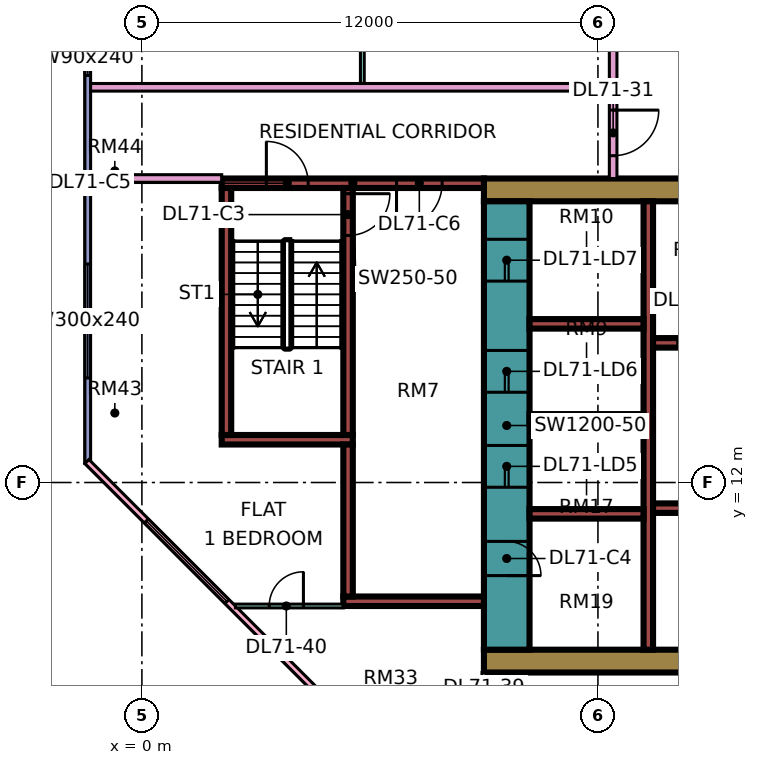
"""IFC4 building model, lengths in metres.
Left out: names, types, materials, properties, quantities, classifications, styles, units other than length and angle.
Written with IfcOpenShell. Run it as: python <this file> out.ifc"""

import sys

from ifc_helpers import new_model, si_unit, direction, frame, frame_2d, origin, place, context, subcontext, project, spatial, rectangle, extrude, element, fill, save


model = new_model("IFC4")
c1 = context("Model", 3, precision=1e-05, world=origin(), true_north=direction((0.0, 1.0)))
c2 = subcontext(c1, "Body", "Model", "MODEL_VIEW")
j1 = project(units=[si_unit("LENGTHUNIT", "METRE"), si_unit("PLANEANGLEUNIT", "RADIAN")], contexts=[c1])
p1 = place(None, origin())
s1 = spatial("IfcSite", under=j1, at=p1, CompositionType="ELEMENT")
p2 = place(p1, origin())
s2 = spatial("IfcBuilding", under=s1, at=p2, CompositionType="ELEMENT")
p3 = place(p2, frame((0.0, 0.0, 303.4)))
s3 = spatial("IfcBuildingStorey", under=s2, at=p3, CompositionType="ELEMENT", Elevation=303.4)
p4 = place(p3, frame((9.0, 7.3, 0.0), z_axis=(0.0, 0.0, 1.0), x_axis=(1.0, 0.0, 0.0)))
e1 = element("IfcWall", 1, at=p4, inside=s3, PredefinedType="SHEAR", context=c2, shape_type="SweptSolid", body=[
    extrude(rectangle(XDim=25.0, YDim=0.6, at=frame_2d((12.5, 0.0))), origin(), (0.0, 0.0, 1.0), 3.75),
])
p5 = place(p3, frame((9.0, 19.7, 0.0), z_axis=(0.0, 0.0, 1.0), x_axis=(1.0, 0.0, 0.0)))
e2 = element("IfcWall", 2, at=p5, inside=s3, PredefinedType="SHEAR", context=c2, shape_type="SweptSolid", body=[
    extrude(rectangle(XDim=25.0, YDim=0.6, at=frame_2d((12.5, 0.0))), origin(), (0.0, 0.0, 1.0), 3.75),
])
p6 = place(p5, frame((19.1, 0.0, 0.0)))
e3 = element("IfcOpeningElement", 3, at=p6, cuts=e2, PredefinedType="OPENING", context=c2, shape_type="SweptSolid", body=[
    extrude(rectangle(XDim=1.8, YDim=2.4, at=frame_2d((0.9, 1.2))), frame((0.0, 0.31, 0.0), z_axis=(0.0, -1.0, 0.0), x_axis=(1.0, 0.0, 0.0)), (0.0, 0.0, 1.0), 0.62),
])
p7 = place(p3, frame((9.6, 7.6, 0.0), z_axis=(0.0, 0.0, 1.0), x_axis=(0.0, 1.0, 0.0)))
e4 = element("IfcWall", 4, at=p7, inside=s3, PredefinedType="SHEAR", context=c2, shape_type="SweptSolid", body=[
    extrude(rectangle(XDim=11.8, YDim=1.2, at=frame_2d((5.9, 0.0))), origin(), (0.0, 0.0, 1.0), 3.75),
])
p8 = place(p7, frame((4.275, 0.0, 0.0)))
e5 = element("IfcOpeningElement", 5, at=p8, cuts=e4, PredefinedType="OPENING", context=c2, shape_type="SweptSolid", body=[
    extrude(rectangle(XDim=1.1, YDim=2.2, at=frame_2d((0.55, 1.1))), frame((0.0, 0.61, 0.0), z_axis=(0.0, -1.0, 0.0), x_axis=(1.0, 0.0, 0.0)), (0.0, 0.0, 1.0), 1.22),
])
p9 = place(p7, frame((6.775, 0.0, 0.0)))
e6 = element("IfcOpeningElement", 6, at=p9, cuts=e4, PredefinedType="OPENING", context=c2, shape_type="SweptSolid", body=[
    extrude(rectangle(XDim=1.1, YDim=2.2, at=frame_2d((0.55, 1.1))), frame((0.0, 0.61, 0.0), z_axis=(0.0, -1.0, 0.0), x_axis=(1.0, 0.0, 0.0)), (0.0, 0.0, 1.0), 1.22),
])
p10 = place(p7, frame((9.7, 0.0, 0.0)))
e7 = element("IfcOpeningElement", 7, at=p10, cuts=e4, PredefinedType="OPENING", context=c2, shape_type="SweptSolid", body=[
    extrude(rectangle(XDim=1.1, YDim=2.2, at=frame_2d((0.55, 1.1))), frame((0.0, 0.61, 0.0), z_axis=(0.0, -1.0, 0.0), x_axis=(1.0, 0.0, 0.0)), (0.0, 0.0, 1.0), 1.22),
])
p11 = place(p7, frame((1.95, 0.0, 0.0)))
e8 = element("IfcOpeningElement", 8, at=p11, cuts=e4, PredefinedType="OPENING", context=c2, shape_type="SweptSolid", body=[
    extrude(rectangle(XDim=0.9, YDim=2.1, at=frame_2d((0.45, 1.05))), frame((0.0, 0.61, 0.0), z_axis=(0.0, -1.0, 0.0), x_axis=(1.0, 0.0, 0.0)), (0.0, 0.0, 1.0), 1.22),
])
p12 = place(p3, frame((13.325, 7.6, 0.0), z_axis=(0.0, 0.0, 1.0), x_axis=(0.0, 1.0, 0.0)))
e9 = element("IfcWall", 9, at=p12, inside=s3, PredefinedType="SHEAR", context=c2, shape_type="SweptSolid", body=[
    extrude(rectangle(XDim=11.8, YDim=0.25, at=frame_2d((5.9, 0.0))), origin(), (0.0, 0.0, 1.0), 3.75),
])
p13 = place(p3, frame((13.45, 11.325, 0.0), z_axis=(0.0, 0.0, 1.0), x_axis=(1.0, 0.0, 0.0)))
e10 = element("IfcWall", 10, at=p13, inside=s3, PredefinedType="SHEAR", context=c2, shape_type="SweptSolid", body=[
    extrude(rectangle(XDim=19.95, YDim=0.25, at=frame_2d((9.975, 0.0))), origin(), (0.0, 0.0, 1.0), 3.75),
])
p14 = place(p13, frame((2.8, 0.0, 0.0)))
e11 = element("IfcOpeningElement", 11, at=p14, cuts=e10, PredefinedType="OPENING", context=c2, shape_type="SweptSolid", body=[
    extrude(rectangle(XDim=0.9, YDim=2.1, at=frame_2d((0.45, 1.05))), frame((0.0, 0.135, 0.0), z_axis=(0.0, -1.0, 0.0), x_axis=(1.0, 0.0, 0.0)), (0.0, 0.0, 1.0), 0.27),
])
p15 = place(p13, frame((8.175, 0.0, 0.0)))
e12 = element("IfcOpeningElement", 12, at=p15, cuts=e10, PredefinedType="OPENING", context=c2, shape_type="SweptSolid", body=[
    extrude(rectangle(XDim=0.9, YDim=2.1, at=frame_2d((0.45, 1.05))), frame((0.0, 0.135, 0.0), z_axis=(0.0, -1.0, 0.0), x_axis=(1.0, 0.0, 0.0)), (0.0, 0.0, 1.0), 0.27),
])
p16 = place(p13, frame((13.175, 0.0, 0.0)))
e13 = element("IfcOpeningElement", 13, at=p16, cuts=e10, PredefinedType="OPENING", context=c2, shape_type="SweptSolid", body=[
    extrude(rectangle(XDim=0.9, YDim=2.1, at=frame_2d((0.45, 1.05))), frame((0.0, 0.135, 0.0), z_axis=(0.0, -1.0, 0.0), x_axis=(1.0, 0.0, 0.0)), (0.0, 0.0, 1.0), 0.27),
])
p17 = place(p13, frame((17.65, 0.0, 0.0)))
e14 = element("IfcOpeningElement", 14, at=p17, cuts=e10, PredefinedType="OPENING", context=c2, shape_type="SweptSolid", body=[
    extrude(rectangle(XDim=0.9, YDim=2.1, at=frame_2d((0.45, 1.05))), frame((0.0, 0.135, 0.0), z_axis=(0.0, -1.0, 0.0), x_axis=(1.0, 0.0, 0.0)), (0.0, 0.0, 1.0), 0.27),
])
p18 = place(p3, frame((13.45, 15.675, 0.0), z_axis=(0.0, 0.0, 1.0), x_axis=(1.0, 0.0, 0.0)))
e15 = element("IfcWall", 15, at=p18, inside=s3, PredefinedType="SHEAR", context=c2, shape_type="SweptSolid", body=[
    extrude(rectangle(XDim=13.75, YDim=0.25, at=frame_2d((6.875, 0.0))), origin(), (0.0, 0.0, 1.0), 3.75),
])
p19 = place(p18, frame((0.65, 0.0, 0.0)))
e16 = element("IfcOpeningElement", 16, at=p19, cuts=e15, PredefinedType="OPENING", context=c2, shape_type="SweptSolid", body=[
    extrude(rectangle(XDim=1.2, YDim=2.2, at=frame_2d((0.6, 1.1))), frame((0.0, 0.135, 0.0), z_axis=(0.0, -1.0, 0.0), x_axis=(1.0, 0.0, 0.0)), (0.0, 0.0, 1.0), 0.27),
])
p20 = place(p18, frame((3.4, 0.0, 0.0)))
e17 = element("IfcOpeningElement", 17, at=p20, cuts=e15, PredefinedType="OPENING", context=c2, shape_type="SweptSolid", body=[
    extrude(rectangle(XDim=1.2, YDim=2.2, at=frame_2d((0.6, 1.1))), frame((0.0, 0.135, 0.0), z_axis=(0.0, -1.0, 0.0), x_axis=(1.0, 0.0, 0.0)), (0.0, 0.0, 1.0), 0.27),
])
p21 = place(p18, frame((6.15, 0.0, 0.0)))
e18 = element("IfcOpeningElement", 18, at=p21, cuts=e15, PredefinedType="OPENING", context=c2, shape_type="SweptSolid", body=[
    extrude(rectangle(XDim=1.2, YDim=2.2, at=frame_2d((0.6, 1.1))), frame((0.0, 0.135, 0.0), z_axis=(0.0, -1.0, 0.0), x_axis=(1.0, 0.0, 0.0)), (0.0, 0.0, 1.0), 0.27),
])
p22 = place(p18, frame((8.9, 0.0, 0.0)))
e19 = element("IfcOpeningElement", 19, at=p22, cuts=e15, PredefinedType="OPENING", context=c2, shape_type="SweptSolid", body=[
    extrude(rectangle(XDim=1.2, YDim=2.2, at=frame_2d((0.6, 1.1))), frame((0.0, 0.135, 0.0), z_axis=(0.0, -1.0, 0.0), x_axis=(1.0, 0.0, 0.0)), (0.0, 0.0, 1.0), 0.27),
])
p23 = place(p18, frame((11.8, 0.0, 0.0)))
e20 = element("IfcOpeningElement", 20, at=p23, cuts=e15, PredefinedType="OPENING", context=c2, shape_type="SweptSolid", body=[
    extrude(rectangle(XDim=0.9, YDim=2.1, at=frame_2d((0.45, 1.05))), frame((0.0, 0.135, 0.0), z_axis=(0.0, -1.0, 0.0), x_axis=(1.0, 0.0, 0.0)), (0.0, 0.0, 1.0), 0.27),
])
for number, where, z_axis, x_axis in (
    (21, (10.2, 11.175, 0.0), (0.0, 0.0, 1.0), (1.0, 0.0, 0.0)),
    (22, (10.2, 13.675, 0.0), (0.0, 0.0, 1.0), (1.0, 0.0, 0.0)),
    (23, (10.2, 16.175, 0.0), (0.0, 0.0, 1.0), (1.0, 0.0, 0.0)),
):
    element("IfcWall", number, at=place(p3, frame(where, z_axis=z_axis, x_axis=x_axis)), inside=s3, PredefinedType="SHEAR", context=c2, shape_type="SweptSolid", body=[
        extrude(rectangle(XDim=3.0, YDim=0.25, at=frame_2d((1.5, 0.0))), origin(), (0.0, 0.0, 1.0), 3.75),
    ])
p24 = place(p3, frame((2.1, 19.875, 0.0), z_axis=(0.0, 0.0, 1.0), x_axis=(1.0, 0.0, 0.0)))
e24 = element("IfcWall", 24, at=p24, inside=s3, PredefinedType="SHEAR", context=c2, shape_type="SweptSolid", body=[
    extrude(rectangle(XDim=6.9, YDim=0.25, at=frame_2d((3.45, 0.0))), origin(), (0.0, 0.0, 1.0), 3.75),
])
p25 = place(p24, frame((1.175, 0.0, 0.0)))
e25 = element("IfcOpeningElement", 25, at=p25, cuts=e24, PredefinedType="OPENING", context=c2, shape_type="SweptSolid", body=[
    extrude(rectangle(XDim=1.1, YDim=2.2, at=frame_2d((0.55, 1.1))), frame((0.0, 0.135, 0.0), z_axis=(0.0, -1.0, 0.0), x_axis=(1.0, 0.0, 0.0)), (0.0, 0.0, 1.0), 0.27),
])
p26 = place(p24, frame((4.6, 0.0, 0.0)))
e26 = element("IfcOpeningElement", 26, at=p26, cuts=e24, PredefinedType="OPENING", context=c2, shape_type="SweptSolid", body=[
    extrude(rectangle(XDim=1.2, YDim=2.2, at=frame_2d((0.6, 1.1))), frame((0.0, 0.135, 0.0), z_axis=(0.0, -1.0, 0.0), x_axis=(1.0, 0.0, 0.0)), (0.0, 0.0, 1.0), 0.27),
])
p27 = place(p3, frame((2.1, 13.125, 0.0), z_axis=(0.0, 0.0, 1.0), x_axis=(1.0, 0.0, 0.0)))
e27 = element("IfcWall", 27, at=p27, inside=s3, PredefinedType="SHEAR", context=c2, shape_type="SweptSolid", body=[
    extrude(rectangle(XDim=3.45, YDim=0.25, at=frame_2d((1.725, 0.0))), origin(), (0.0, 0.0, 1.0), 3.75),
])
p28 = place(p3, frame((2.225, 13.25, 0.0), z_axis=(0.0, 0.0, 1.0), x_axis=(0.0, 1.0, 0.0)))
e28 = element("IfcWall", 28, at=p28, inside=s3, PredefinedType="SHEAR", context=c2, shape_type="SweptSolid", body=[
    extrude(rectangle(XDim=6.5, YDim=0.25, at=frame_2d((3.25, 0.0))), origin(), (0.0, 0.0, 1.0), 3.75),
])
p29 = place(p3, frame((5.425, 13.25, 0.0), z_axis=(0.0, 0.0, 1.0), x_axis=(0.0, 1.0, 0.0)))
e29 = element("IfcWall", 29, at=p29, inside=s3, PredefinedType="SHEAR", context=c2, shape_type="SweptSolid", body=[
    extrude(rectangle(XDim=6.5, YDim=0.25, at=frame_2d((3.25, 0.0))), origin(), (0.0, 0.0, 1.0), 3.75),
])
p30 = place(p29, frame((5.25, 0.0, 0.0)))
e30 = element("IfcOpeningElement", 30, at=p30, cuts=e29, PredefinedType="OPENING", context=c2, shape_type="SweptSolid", body=[
    extrude(rectangle(XDim=1.1, YDim=2.2, at=frame_2d((0.55, 1.1))), frame((0.0, 0.135, 0.0), z_axis=(0.0, -1.0, 0.0), x_axis=(1.0, 0.0, 0.0)), (0.0, 0.0, 1.0), 0.27),
])
p31 = place(p3, frame((5.3, 8.875, 0.0), z_axis=(0.0, 0.0, 1.0), x_axis=(1.0, 0.0, 0.0)))
e31 = element("IfcWall", 31, at=p31, inside=s3, PredefinedType="SHEAR", context=c2, shape_type="SweptSolid", body=[
    extrude(rectangle(XDim=3.7, YDim=0.25, at=frame_2d((1.85, 0.0))), origin(), (0.0, 0.0, 1.0), 3.75),
])
p32 = place(p3, frame((5.425, 9.0, 0.0), z_axis=(0.0, 0.0, 1.0), x_axis=(0.0, 1.0, 0.0)))
e32 = element("IfcWall", 32, at=p32, inside=s3, PredefinedType="SHEAR", context=c2, shape_type="SweptSolid", body=[
    extrude(rectangle(XDim=4.0, YDim=0.25, at=frame_2d((2.0, 0.0))), origin(), (0.0, 0.0, 1.0), 3.75),
])
p33 = place(p3, frame((-1.425, 23.925, 0.0), z_axis=(0.0, 0.0, 1.0), x_axis=(0.0, -1.0, 0.0)))
e33 = element("IfcWall", 33, at=p33, inside=s3, PredefinedType="SOLIDWALL", context=c2, shape_type="SweptSolid", body=[
    extrude(rectangle(XDim=11.425, YDim=0.15, at=frame_2d((5.712, 0.0))), origin(), (0.0, 0.0, 1.0), 3.35),
])
p34 = place(p33, frame((0.312, 0.0, 0.45)))
e34 = element("IfcOpeningElement", 34, at=p34, cuts=e33, PredefinedType="OPENING", context=c2, shape_type="SweptSolid", body=[
    extrude(rectangle(XDim=0.9, YDim=2.4, at=frame_2d((0.45, 1.2))), frame((0.0, 0.085, 0.0), z_axis=(0.0, -1.0, 0.0), x_axis=(1.0, 0.0, 0.0)), (0.0, 0.0, 1.0), 0.17),
])
p35 = place(p33, frame((6.175, 0.0, 0.45)))
e35 = element("IfcOpeningElement", 35, at=p35, cuts=e33, PredefinedType="OPENING", context=c2, shape_type="SweptSolid", body=[
    extrude(rectangle(XDim=3.0, YDim=2.4, at=frame_2d((1.5, 1.2))), frame((0.0, 0.085, 0.0), z_axis=(0.0, -1.0, 0.0), x_axis=(1.0, 0.0, 0.0)), (0.0, 0.0, 1.0), 0.17),
])
p36 = place(p3, frame((-1.447, 12.553, 0.0), z_axis=(0.0, 0.0, 1.0), x_axis=(0.707106781187, -0.707106781187, 0.0)))
e36 = element("IfcWall", 36, at=p36, inside=s3, PredefinedType="SOLIDWALL", context=c2, shape_type="SweptSolid", body=[
    extrude(rectangle(XDim=19.799, YDim=0.15, at=frame_2d((9.899, 0.0))), origin(), (0.0, 0.0, 1.0), 3.35),
])
p37 = place(p36, frame((2.212, 0.0, 0.45)))
e37 = element("IfcOpeningElement", 37, at=p37, cuts=e36, PredefinedType="OPENING", context=c2, shape_type="SweptSolid", body=[
    extrude(rectangle(XDim=3.0, YDim=2.4, at=frame_2d((1.5, 1.2))), frame((0.0, 0.085, 0.0), z_axis=(0.0, -1.0, 0.0), x_axis=(1.0, 0.0, 0.0)), (0.0, 0.0, 1.0), 0.17),
])
p38 = place(p36, frame((10.216, 0.0, 0.45)))
e38 = element("IfcOpeningElement", 38, at=p38, cuts=e36, PredefinedType="OPENING", context=c2, shape_type="SweptSolid", body=[
    extrude(rectangle(XDim=3.0, YDim=2.4, at=frame_2d((1.5, 1.2))), frame((0.0, 0.085, 0.0), z_axis=(0.0, -1.0, 0.0), x_axis=(1.0, 0.0, 0.0)), (0.0, 0.0, 1.0), 0.17),
])
p39 = place(p3, frame((-1.35, 20.0, 0.0), z_axis=(0.0, 0.0, 1.0), x_axis=(1.0, 0.0, 0.0)))
e39 = element("IfcWall", 39, at=p39, inside=s3, PredefinedType="PARTITIONING", context=c2, shape_type="SweptSolid", body=[
    extrude(rectangle(XDim=3.45, YDim=0.2, at=frame_2d((1.725, 0.0))), origin(), (0.0, 0.0, 1.0), 3.35),
])
p40 = place(p3, frame((-1.35, 22.4, 0.0), z_axis=(0.0, 0.0, 1.0), x_axis=(1.0, 0.0, 0.0)))
e40 = element("IfcWall", 40, at=p40, inside=s3, PredefinedType="PARTITIONING", context=c2, shape_type="SweptSolid", body=[
    extrude(rectangle(XDim=13.65, YDim=0.2, at=frame_2d((6.825, 0.0))), origin(), (0.0, 0.0, 1.0), 3.35),
])
p41 = place(p3, frame((2.461, 8.75, 0.0), z_axis=(0.0, 0.0, 1.0), x_axis=(1.0, 0.0, 0.0)))
e41 = element("IfcWall", 41, at=p41, inside=s3, PredefinedType="PARTITIONING", context=c2, shape_type="SweptSolid", body=[
    extrude(rectangle(XDim=2.839, YDim=0.1, at=frame_2d((1.419, 0.0))), origin(), (0.0, 0.0, 1.0), 3.35),
])
p42 = place(p41, frame((0.889, 0.0, 0.0)))
e42 = element("IfcOpeningElement", 42, at=p42, cuts=e41, PredefinedType="OPENING", context=c2, shape_type="SweptSolid", body=[
    extrude(rectangle(XDim=0.9, YDim=2.1, at=frame_2d((0.45, 1.05))), frame((0.0, 0.06, 0.0), z_axis=(0.0, -1.0, 0.0), x_axis=(1.0, 0.0, 0.0)), (0.0, 0.0, 1.0), 0.12),
])
p43 = place(p3, frame((5.8, 22.5, 0.0), z_axis=(0.0, 0.0, 1.0), x_axis=(0.0, 1.0, 0.0)))
e43 = element("IfcWall", 43, at=p43, inside=s3, PredefinedType="PARTITIONING", context=c2, shape_type="SweptSolid", body=[
    extrude(rectangle(XDim=4.45, YDim=0.1, at=frame_2d((2.225, 0.0))), origin(), (0.0, 0.0, 1.0), 3.35),
])
p44 = place(p3, frame((9.0, 3.95, 0.0), z_axis=(0.0, 0.0, 1.0), x_axis=(0.0, 1.0, 0.0)))
e44 = element("IfcWall", 44, at=p44, inside=s3, PredefinedType="PARTITIONING", context=c2, shape_type="SweptSolid", body=[
    extrude(rectangle(XDim=3.05, YDim=0.1, at=frame_2d((1.525, 0.0))), origin(), (0.0, 0.0, 1.0), 3.35),
])
p45 = place(p44, frame((1.1, 0.0, 0.0)))
e45 = element("IfcOpeningElement", 45, at=p45, cuts=e44, PredefinedType="OPENING", context=c2, shape_type="SweptSolid", body=[
    extrude(rectangle(XDim=0.9, YDim=2.1, at=frame_2d((0.45, 1.05))), frame((0.0, 0.06, 0.0), z_axis=(0.0, -1.0, 0.0), x_axis=(1.0, 0.0, 0.0)), (0.0, 0.0, 1.0), 0.12),
])
p46 = place(p3, frame((12.4, 20.0, 0.0), z_axis=(0.0, 0.0, 1.0), x_axis=(0.0, 1.0, 0.0)))
e46 = element("IfcWall", 46, at=p46, inside=s3, PredefinedType="PARTITIONING", context=c2, shape_type="SweptSolid", body=[
    extrude(rectangle(XDim=34.0, YDim=0.2, at=frame_2d((17.0, 0.0))), origin(), (0.0, 0.0, 1.0), 3.35),
])
p47 = place(p46, frame((19.8, 0.0, 0.0)))
e47 = element("IfcOpeningElement", 47, at=p47, cuts=e46, PredefinedType="OPENING", context=c2, shape_type="SweptSolid", body=[
    extrude(rectangle(XDim=1.0, YDim=2.1, at=frame_2d((0.5, 1.05))), frame((0.0, 0.11, 0.0), z_axis=(0.0, -1.0, 0.0), x_axis=(1.0, 0.0, 0.0)), (0.0, 0.0, 1.0), 0.22),
])
p48 = place(p46, frame((0.6, 0.0, 0.0)))
e48 = element("IfcOpeningElement", 48, at=p48, cuts=e46, PredefinedType="OPENING", context=c2, shape_type="SweptSolid", body=[
    extrude(rectangle(XDim=1.2, YDim=2.1, at=frame_2d((0.6, 1.05))), frame((0.0, 0.11, 0.0), z_axis=(0.0, -1.0, 0.0), x_axis=(1.0, 0.0, 0.0)), (0.0, 0.0, 1.0), 0.22),
])
p49 = place(p46, frame((4.5, 0.0, 0.0)))
e49 = element("IfcOpeningElement", 49, at=p49, cuts=e46, PredefinedType="OPENING", context=c2, shape_type="SweptSolid", body=[
    extrude(rectangle(XDim=1.0, YDim=2.1, at=frame_2d((0.5, 1.05))), frame((0.0, 0.11, 0.0), z_axis=(0.0, -1.0, 0.0), x_axis=(1.0, 0.0, 0.0)), (0.0, 0.0, 1.0), 0.22),
])
p50 = place(p34, origin())
e50 = element("IfcWindow", 50, at=p50, inside=s3, PartitioningType="SINGLE_PANEL", PredefinedType="WINDOW", context=c2, shape_type="SweptSolid", body=[
    extrude(rectangle(XDim=0.9, YDim=2.4, at=frame_2d((0.45, 1.2))), frame((0.0, 0.03, 0.0), z_axis=(0.0, -1.0, 0.0), x_axis=(1.0, 0.0, 0.0)), (0.0, 0.0, 1.0), 0.06),
])
fill(e34, e50)
p51 = place(p35, origin())
e51 = element("IfcWindow", 51, at=p51, inside=s3, PartitioningType="SINGLE_PANEL", PredefinedType="WINDOW", context=c2, shape_type="SweptSolid", body=[
    extrude(rectangle(XDim=3.0, YDim=2.4, at=frame_2d((1.5, 1.2))), frame((0.0, 0.03, 0.0), z_axis=(0.0, -1.0, 0.0), x_axis=(1.0, 0.0, 0.0)), (0.0, 0.0, 1.0), 0.06),
])
fill(e35, e51)
p52 = place(p37, origin())
e52 = element("IfcWindow", 52, at=p52, inside=s3, PartitioningType="SINGLE_PANEL", PredefinedType="WINDOW", context=c2, shape_type="SweptSolid", body=[
    extrude(rectangle(XDim=3.0, YDim=2.4, at=frame_2d((1.5, 1.2))), frame((0.0, 0.03, 0.0), z_axis=(0.0, -1.0, 0.0), x_axis=(1.0, 0.0, 0.0)), (0.0, 0.0, 1.0), 0.06),
])
fill(e37, e52)
p53 = place(p19, origin())
e53 = element("IfcDoor", 53, at=p53, inside=s3, OperationType="DOUBLE_DOOR_SLIDING", PredefinedType="DOOR", context=c2, shape_type="SweptSolid", body=[
    extrude(rectangle(XDim=1.2, YDim=2.2, at=frame_2d((0.6, 1.1))), frame((0.0, 0.025, 0.0), z_axis=(0.0, -1.0, 0.0), x_axis=(1.0, 0.0, 0.0)), (0.0, 0.0, 1.0), 0.05),
])
fill(e16, e53)
p54 = place(p8, origin())
e54 = element("IfcDoor", 54, at=p54, inside=s3, OperationType="DOUBLE_DOOR_SLIDING", PredefinedType="DOOR", context=c2, shape_type="SweptSolid", body=[
    extrude(rectangle(XDim=1.1, YDim=2.2, at=frame_2d((0.55, 1.1))), frame((0.0, 0.025, 0.0), z_axis=(0.0, -1.0, 0.0), x_axis=(1.0, 0.0, 0.0)), (0.0, 0.0, 1.0), 0.05),
])
fill(e5, e54)
p55 = place(p9, origin())
e55 = element("IfcDoor", 55, at=p55, inside=s3, OperationType="DOUBLE_DOOR_SLIDING", PredefinedType="DOOR", context=c2, shape_type="SweptSolid", body=[
    extrude(rectangle(XDim=1.1, YDim=2.2, at=frame_2d((0.55, 1.1))), frame((0.0, 0.025, 0.0), z_axis=(0.0, -1.0, 0.0), x_axis=(1.0, 0.0, 0.0)), (0.0, 0.0, 1.0), 0.05),
])
fill(e6, e55)
p56 = place(p10, origin())
e56 = element("IfcDoor", 56, at=p56, inside=s3, OperationType="DOUBLE_DOOR_SLIDING", PredefinedType="DOOR", context=c2, shape_type="SweptSolid", body=[
    extrude(rectangle(XDim=1.1, YDim=2.2, at=frame_2d((0.55, 1.1))), frame((0.0, 0.025, 0.0), z_axis=(0.0, -1.0, 0.0), x_axis=(1.0, 0.0, 0.0)), (0.0, 0.0, 1.0), 0.05),
])
fill(e7, e56)
p57 = place(p30, origin())
e57 = element("IfcDoor", 57, at=p57, inside=s3, OperationType="SINGLE_SWING_RIGHT", PredefinedType="DOOR", context=c2, shape_type="SweptSolid", body=[
    extrude(rectangle(XDim=1.1, YDim=2.2, at=frame_2d((0.55, 1.1))), frame((0.0, 0.025, 0.0), z_axis=(0.0, -1.0, 0.0), x_axis=(1.0, 0.0, 0.0)), (0.0, 0.0, 1.0), 0.05),
])
fill(e30, e57)
p58 = place(p11, frame((0.9, 0.0, 0.0), z_axis=(0.0, 0.0, 1.0), x_axis=(-1.0, 0.0, 0.0)))
e58 = element("IfcDoor", 58, at=p58, inside=s3, OperationType="SINGLE_SWING_LEFT", PredefinedType="DOOR", context=c2, shape_type="SweptSolid", body=[
    extrude(rectangle(XDim=0.9, YDim=2.1, at=frame_2d((0.45, 1.05))), frame((0.0, 0.025, 0.0), z_axis=(0.0, -1.0, 0.0), x_axis=(1.0, 0.0, 0.0)), (0.0, 0.0, 1.0), 0.05),
])
fill(e8, e58)
p59 = place(p25, origin())
e59 = element("IfcDoor", 59, at=p59, inside=s3, OperationType="SINGLE_SWING_LEFT", PredefinedType="DOOR", context=c2, shape_type="SweptSolid", body=[
    extrude(rectangle(XDim=1.1, YDim=2.2, at=frame_2d((0.55, 1.1))), frame((0.0, 0.025, 0.0), z_axis=(0.0, -1.0, 0.0), x_axis=(1.0, 0.0, 0.0)), (0.0, 0.0, 1.0), 0.05),
])
fill(e25, e59)
p60 = place(p26, frame((1.2, 0.0, 0.0), z_axis=(0.0, 0.0, 1.0), x_axis=(-1.0, 0.0, 0.0)))
e60 = element("IfcDoor", 60, at=p60, inside=s3, OperationType="SINGLE_SWING_LEFT", PredefinedType="DOOR", context=c2, shape_type="SweptSolid", body=[
    extrude(rectangle(XDim=1.2, YDim=2.2, at=frame_2d((0.6, 1.1))), frame((0.0, 0.025, 0.0), z_axis=(0.0, -1.0, 0.0), x_axis=(1.0, 0.0, 0.0)), (0.0, 0.0, 1.0), 0.05),
])
fill(e26, e60)
p61 = place(p48, origin())
e61 = element("IfcDoor", 61, at=p61, inside=s3, OperationType="SINGLE_SWING_RIGHT", PredefinedType="DOOR", context=c2, shape_type="SweptSolid", body=[
    extrude(rectangle(XDim=1.2, YDim=2.1, at=frame_2d((0.6, 1.05))), frame((0.0, 0.025, 0.0), z_axis=(0.0, -1.0, 0.0), x_axis=(1.0, 0.0, 0.0)), (0.0, 0.0, 1.0), 0.05),
])
fill(e48, e61)
p62 = place(p42, frame((0.9, 0.0, 0.0), z_axis=(0.0, 0.0, 1.0), x_axis=(-1.0, 0.0, 0.0)))
e62 = element("IfcDoor", 62, at=p62, inside=s3, OperationType="SINGLE_SWING_RIGHT", PredefinedType="DOOR", context=c2, shape_type="SweptSolid", body=[
    extrude(rectangle(XDim=0.9, YDim=2.1, at=frame_2d((0.45, 1.05))), frame((0.0, 0.025, 0.0), z_axis=(0.0, -1.0, 0.0), x_axis=(1.0, 0.0, 0.0)), (0.0, 0.0, 1.0), 0.05),
])
fill(e42, e62)
save(model, sys.argv[1])
